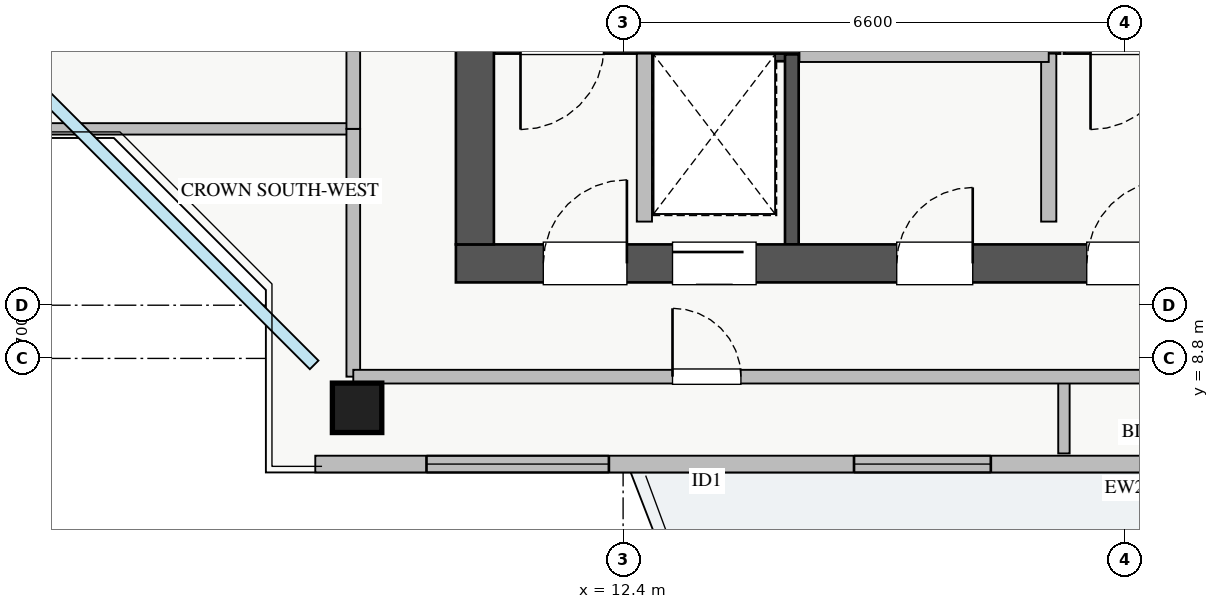
"""IFC4 building model, lengths in metres.
Left out: names, types, materials, properties, quantities, classifications, styles, units other than length and angle.
Written with IfcOpenShell. Run it as: python <this file> out.ifc"""

import sys

from ifc_helpers import new_model, si_unit, direction, frame, frame_2d, origin, origin_2d, place, context, subcontext, project, spatial, rectangle, extrude, source, transform, mapped, element, fill, save


model = new_model("IFC4")
c1 = context("Model", 3, precision=1e-05, world=origin(), true_north=direction((0.0, 1.0)))
c2 = subcontext(c1, "Body", "Model", "MODEL_VIEW")
j1 = project(units=[si_unit("LENGTHUNIT", "METRE"), si_unit("PLANEANGLEUNIT", "RADIAN")], contexts=[c1])
p1 = place(None, origin())
s1 = spatial("IfcSite", under=j1, at=p1, CompositionType="ELEMENT")
p2 = place(p1, origin())
s2 = spatial("IfcBuilding", under=s1, at=p2, CompositionType="ELEMENT")
p3 = place(p2, frame((0.0, 0.0, 250.25)))
s3 = spatial("IfcBuildingStorey", under=s2, at=p3, CompositionType="ELEMENT", Elevation=250.25)
p4 = place(p3, frame((12.68, 12.8, 0.0), z_axis=(0.0, 0.0, 1.0), x_axis=(1.0, 0.0, 0.0)))
e1 = element("IfcWall", 1, at=p4, inside=s3, PredefinedType="SHEAR", context=c2, shape_type="SweptSolid", body=[
    extrude(rectangle(XDim=1.94, YDim=0.18, at=frame_2d((0.97, 0.0))), origin(), (0.0, 0.0, 1.0), 3.07),
])
p5 = place(p3, frame((14.62, 10.3, 0.0), z_axis=(0.0, 0.0, 1.0), x_axis=(0.0, 1.0, 0.0)))
e2 = element("IfcWall", 2, at=p5, inside=s3, PredefinedType="SHEAR", context=c2, shape_type="SweptSolid", body=[
    extrude(rectangle(XDim=2.5, YDim=0.18, at=frame_2d((1.25, 0.0))), origin(), (0.0, 0.0, 1.0), 3.07),
])
p6 = place(p3, frame((10.7, 12.91, 0.0), z_axis=(0.0, 0.0, 1.0), x_axis=(1.0, 0.0, 0.0)))
e3 = element("IfcWall", 3, at=p6, inside=s3, PredefinedType="SHEAR", context=c2, shape_type="SweptSolid", body=[
    extrude(rectangle(XDim=7.45, YDim=0.2, at=frame_2d((3.725, 0.0))), origin(), (0.0, 0.0, 1.0), 3.25),
])
p7 = place(p6, frame((0.35, 0.0, 0.0)))
e4 = element("IfcOpeningElement", 4, at=p7, cuts=e3, PredefinedType="OPENING", context=c2, shape_type="SweptSolid", body=[
    extrude(rectangle(XDim=1.1, YDim=2.05, at=frame_2d((0.55, 1.025))), frame((0.0, 0.11, 0.0), z_axis=(0.0, -1.0, 0.0), x_axis=(1.0, 0.0, 0.0)), (0.0, 0.0, 1.0), 0.22),
])
p8 = place(p3, frame((18.2, 12.91, 0.0), z_axis=(0.0, 0.0, 1.0), x_axis=(1.0, 0.0, 0.0)))
e5 = element("IfcWall", 5, at=p8, inside=s3, PredefinedType="SHEAR", context=c2, shape_type="SweptSolid", body=[
    extrude(rectangle(XDim=7.15, YDim=0.2, at=frame_2d((3.575, 0.0))), origin(), (0.0, 0.0, 1.0), 3.25),
])
p9 = place(p8, frame((0.35, 0.0, 0.0)))
e6 = element("IfcOpeningElement", 6, at=p9, cuts=e5, PredefinedType="OPENING", context=c2, shape_type="SweptSolid", body=[
    extrude(rectangle(XDim=1.1, YDim=2.05, at=frame_2d((0.55, 1.025))), frame((0.0, 0.11, 0.0), z_axis=(0.0, -1.0, 0.0), x_axis=(1.0, 0.0, 0.0)), (0.0, 0.0, 1.0), 0.22),
])
p10 = place(p3, frame((10.2, 10.05, 0.0), z_axis=(0.0, 0.0, 1.0), x_axis=(1.0, 0.0, 0.0)))
e7 = element("IfcWall", 7, at=p10, inside=s3, PredefinedType="SHEAR", context=c2, shape_type="SweptSolid", body=[
    extrude(rectangle(XDim=17.6, YDim=0.5, at=frame_2d((8.8, 0.0))), origin(), (0.0, 0.0, 1.0), 3.25),
])
p11 = place(p10, frame((1.15, 0.0, 0.0)))
e8 = element("IfcOpeningElement", 8, at=p11, cuts=e7, PredefinedType="OPENING", context=c2, shape_type="SweptSolid", body=[
    extrude(rectangle(XDim=1.1, YDim=2.05, at=frame_2d((0.55, 1.025))), frame((0.0, 0.26, 0.0), z_axis=(0.0, -1.0, 0.0), x_axis=(1.0, 0.0, 0.0)), (0.0, 0.0, 1.0), 0.52),
])
p12 = place(p10, frame((8.3, 0.0, 0.0)))
e9 = element("IfcOpeningElement", 9, at=p12, cuts=e7, PredefinedType="OPENING", context=c2, shape_type="SweptSolid", body=[
    extrude(rectangle(XDim=1.1, YDim=2.05, at=frame_2d((0.55, 1.025))), frame((0.0, 0.26, 0.0), z_axis=(0.0, -1.0, 0.0), x_axis=(1.0, 0.0, 0.0)), (0.0, 0.0, 1.0), 0.52),
])
p13 = place(p10, frame((2.85, 0.0, 0.0)))
e10 = element("IfcOpeningElement", 10, at=p13, cuts=e7, PredefinedType="OPENING", context=c2, shape_type="SweptSolid", body=[
    extrude(rectangle(XDim=1.1, YDim=2.05, at=frame_2d((0.55, 1.025))), frame((0.0, 0.26, 0.0), z_axis=(0.0, -1.0, 0.0), x_axis=(1.0, 0.0, 0.0)), (0.0, 0.0, 1.0), 0.52),
])
p14 = place(p10, frame((5.8, 0.0, 0.0)))
e11 = element("IfcOpeningElement", 11, at=p14, cuts=e7, PredefinedType="OPENING", context=c2, shape_type="SweptSolid", body=[
    extrude(rectangle(XDim=1.0, YDim=2.05, at=frame_2d((0.5, 1.025))), frame((0.0, 0.26, 0.0), z_axis=(0.0, -1.0, 0.0), x_axis=(1.0, 0.0, 0.0)), (0.0, 0.0, 1.0), 0.52),
])
p15 = place(p10, frame((14.74, 0.0, 0.0)))
e12 = element("IfcOpeningElement", 12, at=p15, cuts=e7, PredefinedType="OPENING", context=c2, shape_type="SweptSolid", body=[
    extrude(rectangle(XDim=1.0, YDim=2.05, at=frame_2d((0.5, 1.025))), frame((0.0, 0.26, 0.0), z_axis=(0.0, -1.0, 0.0), x_axis=(1.0, 0.0, 0.0)), (0.0, 0.0, 1.0), 0.52),
])
p16 = place(p10, frame((10.64, 0.0, 0.0)))
e13 = element("IfcOpeningElement", 13, at=p16, cuts=e7, PredefinedType="OPENING", context=c2, shape_type="SweptSolid", body=[
    extrude(rectangle(XDim=1.0, YDim=2.05, at=frame_2d((0.5, 1.025))), frame((0.0, 0.26, 0.0), z_axis=(0.0, -1.0, 0.0), x_axis=(1.0, 0.0, 0.0)), (0.0, 0.0, 1.0), 0.52),
])
p17 = place(p10, frame((13.09, 0.0, 0.0)))
e14 = element("IfcOpeningElement", 14, at=p17, cuts=e7, PredefinedType="OPENING", context=c2, shape_type="SweptSolid", body=[
    extrude(rectangle(XDim=1.0, YDim=2.05, at=frame_2d((0.5, 1.025))), frame((0.0, 0.26, 0.0), z_axis=(0.0, -1.0, 0.0), x_axis=(1.0, 0.0, 0.0)), (0.0, 0.0, 1.0), 0.52),
])
p18 = place(p3, frame((10.45, 10.3, 0.0), z_axis=(0.0, 0.0, 1.0), x_axis=(0.0, 1.0, 0.0)))
e15 = element("IfcWall", 15, at=p18, inside=s3, PredefinedType="SHEAR", context=c2, shape_type="SweptSolid", body=[
    extrude(rectangle(XDim=6.2, YDim=0.5, at=frame_2d((3.1, 0.0))), origin(), (0.0, 0.0, 1.0), 3.25),
])
m1 = source(origin(), c2, "Body", "SweptSolid", [
    extrude(rectangle(XDim=0.65, YDim=0.65, at=origin_2d()), origin(), (0.0, 0.0, 1.0), 3.25),
])
p19 = place(p3, frame((8.9, 8.15, 0.0), z_axis=(0.0, 0.0, 1.0), x_axis=(1.0, 0.0, 0.0)))
e16 = element("IfcColumn", 16, at=p19, inside=s3, PredefinedType="COLUMN", context=c2, shape_type="MappedRepresentation", body=[
    mapped(m1, transform((0.0, 0.0, 0.0), x_axis=(1.0, 0.0, 0.0), y_axis=(0.0, 1.0, 0.0), z_axis=(0.0, 0.0, 1.0), scale=1.0)),
])
p20 = place(p3, frame((8.35, 7.41, 0.0), z_axis=(0.0, 0.0, 1.0), x_axis=(1.0, 0.0, 0.0)))
e17 = element("IfcWall", 17, at=p20, inside=s3, PredefinedType="STANDARD", context=c2, shape_type="SweptSolid", body=[
    extrude(rectangle(XDim=21.3, YDim=0.22, at=frame_2d((10.65, 0.0))), origin(), (0.0, 0.0, 1.0), 2.61),
])
p21 = place(p20, frame((11.5, 0.0, 0.0)))
e18 = element("IfcOpeningElement", 18, at=p21, cuts=e17, PredefinedType="OPENING", context=c2, shape_type="SweptSolid", body=[
    extrude(rectangle(XDim=1.2, YDim=2.1, at=frame_2d((0.6, 1.05))), frame((0.0, 0.12, 0.0), z_axis=(0.0, -1.0, 0.0), x_axis=(1.0, 0.0, 0.0)), (0.0, 0.0, 1.0), 0.24),
])
p22 = place(p20, frame((1.463, 0.0, 0.9)))
e19 = element("IfcOpeningElement", 19, at=p22, cuts=e17, PredefinedType="OPENING", context=c2, shape_type="SweptSolid", body=[
    extrude(rectangle(XDim=2.4, YDim=1.48, at=frame_2d((1.2, 0.74))), frame((0.0, 0.12, 0.0), z_axis=(0.0, -1.0, 0.0), x_axis=(1.0, 0.0, 0.0)), (0.0, 0.0, 1.0), 0.24),
])
p23 = place(p20, frame((7.088, 0.0, 0.9)))
e20 = element("IfcOpeningElement", 20, at=p23, cuts=e17, PredefinedType="OPENING", context=c2, shape_type="SweptSolid", body=[
    extrude(rectangle(XDim=1.8, YDim=1.45, at=frame_2d((0.9, 0.725))), frame((0.0, 0.12, 0.0), z_axis=(0.0, -1.0, 0.0), x_axis=(1.0, 0.0, 0.0)), (0.0, 0.0, 1.0), 0.24),
])
p24 = place(p20, frame((19.775, 0.0, 0.9)))
e21 = element("IfcOpeningElement", 21, at=p24, cuts=e17, PredefinedType="OPENING", context=c2, shape_type="SweptSolid", body=[
    extrude(rectangle(XDim=1.2, YDim=1.4, at=frame_2d((0.6, 0.7))), frame((0.0, 0.12, 0.0), z_axis=(0.0, -1.0, 0.0), x_axis=(1.0, 0.0, 0.0)), (0.0, 0.0, 1.0), 0.24),
])
p25 = place(p20, frame((14.86, 0.0, 0.9)))
e22 = element("IfcOpeningElement", 22, at=p25, cuts=e17, PredefinedType="OPENING", context=c2, shape_type="SweptSolid", body=[
    extrude(rectangle(XDim=2.4, YDim=1.5, at=frame_2d((1.2, 0.75))), frame((0.0, 0.12, 0.0), z_axis=(0.0, -1.0, 0.0), x_axis=(1.0, 0.0, 0.0)), (0.0, 0.0, 1.0), 0.24),
])
for number, where, z_axis, x_axis in (
    (23, (12.68, 10.6, 0.0), (0.0, 0.0, 1.0), (0.0, 1.0, 0.0)),
    (24, (18.0, 10.6, 0.0), (0.0, 0.0, 1.0), (0.0, 1.0, 0.0)),
):
    element("IfcWall", number, at=place(p3, frame(where, z_axis=z_axis, x_axis=x_axis)), inside=s3, PredefinedType="PARTITIONING", context=c2, shape_type="SweptSolid", body=[
        extrude(rectangle(XDim=2.21, YDim=0.2, at=frame_2d((1.105, 0.0))), origin(), (0.0, 0.0, 1.0), 3.07),
    ])
p26 = place(p3, frame((14.72, 12.8, 0.0), z_axis=(0.0, 0.0, 1.0), x_axis=(1.0, 0.0, 0.0)))
e25 = element("IfcWall", 25, at=p26, inside=s3, PredefinedType="PARTITIONING", context=c2, shape_type="SweptSolid", body=[
    extrude(rectangle(XDim=3.28, YDim=0.2, at=frame_2d((1.64, 0.0))), origin(), (0.0, 0.0, 1.0), 3.07),
])
p27 = place(p3, frame((3.55, 11.82, 0.0), z_axis=(0.0, 0.0, 1.0), x_axis=(1.0, 0.0, 0.0)))
e26 = element("IfcWall", 26, at=p27, inside=s3, PredefinedType="PARTITIONING", context=c2, shape_type="SweptSolid", body=[
    extrude(rectangle(XDim=5.3, YDim=0.15, at=frame_2d((2.65, 0.0))), origin(), (0.0, 0.0, 1.0), 3.07),
])
p28 = place(p3, frame((8.85, 8.56, 0.0), z_axis=(0.0, 0.0, 1.0), x_axis=(0.0, 1.0, 0.0)))
e27 = element("IfcWall", 27, at=p28, inside=s3, PredefinedType="PARTITIONING", context=c2, shape_type="SweptSolid", body=[
    extrude(rectangle(XDim=3.26, YDim=0.18, at=frame_2d((1.63, 0.0))), origin(), (0.0, 0.0, 1.0), 2.569),
])
p29 = place(p3, frame((18.2, 7.55, 0.0), z_axis=(0.0, 0.0, 1.0), x_axis=(0.0, 1.0, 0.0)))
e28 = element("IfcWall", 28, at=p29, inside=s3, PredefinedType="PARTITIONING", context=c2, shape_type="SweptSolid", body=[
    extrude(rectangle(XDim=1.01, YDim=0.15, at=frame_2d((0.505, 0.0))), origin(), (0.0, 0.0, 1.0), 3.07),
])
p30 = place(p3, frame((8.85, 8.56, 0.0), z_axis=(0.0, 0.0, 1.0), x_axis=(1.0, 0.0, 0.0)))
e29 = element("IfcWall", 29, at=p30, inside=s3, PredefinedType="PARTITIONING", context=c2, shape_type="SweptSolid", body=[
    extrude(rectangle(XDim=18.95, YDim=0.18, at=frame_2d((9.475, 0.0))), origin(), (0.0, 0.0, 1.0), 3.07),
])
p31 = place(p30, frame((4.2, 0.0, 0.0)))
e30 = element("IfcOpeningElement", 30, at=p31, cuts=e29, PredefinedType="OPENING", context=c2, shape_type="SweptSolid", body=[
    extrude(rectangle(XDim=0.9, YDim=2.05, at=frame_2d((0.45, 1.025))), frame((0.0, 0.1, 0.0), z_axis=(0.0, -1.0, 0.0), x_axis=(1.0, 0.0, 0.0)), (0.0, 0.0, 1.0), 0.2),
])
p32 = place(p30, frame((12.8, 0.0, 0.0)))
e31 = element("IfcOpeningElement", 31, at=p32, cuts=e29, PredefinedType="OPENING", context=c2, shape_type="SweptSolid", body=[
    extrude(rectangle(XDim=0.9, YDim=2.05, at=frame_2d((0.45, 1.025))), frame((0.0, 0.1, 0.0), z_axis=(0.0, -1.0, 0.0), x_axis=(1.0, 0.0, 0.0)), (0.0, 0.0, 1.0), 0.2),
])
p33 = place(p3, frame((8.85, 11.82, 0.0), z_axis=(0.0, 0.0, 1.0), x_axis=(0.0, 1.0, 0.0)))
e32 = element("IfcWall", 32, at=p33, inside=s3, PredefinedType="PARTITIONING", context=c2, shape_type="SweptSolid", body=[
    extrude(rectangle(XDim=22.36, YDim=0.18, at=frame_2d((11.18, 0.0))), origin(), (0.0, 0.0, 1.0), 2.569),
])
p34 = place(p33, frame((2.475, 0.0, 0.0)))
e33 = element("IfcOpeningElement", 33, at=p34, cuts=e32, PredefinedType="OPENING", context=c2, shape_type="SweptSolid", body=[
    extrude(rectangle(XDim=1.0, YDim=2.05, at=frame_2d((0.5, 1.025))), frame((0.0, 0.1, 0.0), z_axis=(0.0, -1.0, 0.0), x_axis=(1.0, 0.0, 0.0)), (0.0, 0.0, 1.0), 0.2),
])
p35 = place(p33, frame((13.91, 0.0, 0.0)))
e34 = element("IfcOpeningElement", 34, at=p35, cuts=e32, PredefinedType="OPENING", context=c2, shape_type="SweptSolid", body=[
    extrude(rectangle(XDim=1.0, YDim=2.05, at=frame_2d((0.5, 1.025))), frame((0.0, 0.1, 0.0), z_axis=(0.0, -1.0, 0.0), x_axis=(1.0, 0.0, 0.0)), (0.0, 0.0, 1.0), 0.2),
])
m2 = source(origin(), c2, "Body", "SweptSolid", [
    extrude(rectangle(XDim=2.4, YDim=1.48, at=frame_2d((1.2, 0.74))), frame((0.0, 0.03, 0.0), z_axis=(0.0, -1.0, 0.0), x_axis=(1.0, 0.0, 0.0)), (0.0, 0.0, 1.0), 0.06),
])
p36 = place(p22, origin())
e35 = element("IfcWindow", 35, at=p36, inside=s3, PartitioningType="TRIPLE_PANEL_VERTICAL", PredefinedType="WINDOW", context=c2, shape_type="MappedRepresentation", body=[
    mapped(m2, transform((0.0, 0.0, 0.0), x_axis=(1.0, 0.0, 0.0), y_axis=(0.0, 1.0, 0.0), z_axis=(0.0, 0.0, 1.0), scale=1.0)),
])
fill(e19, e35)
m3 = source(origin(), c2, "Body", "SweptSolid", [
    extrude(rectangle(XDim=1.8, YDim=1.45, at=frame_2d((0.9, 0.725))), frame((0.0, 0.03, 0.0), z_axis=(0.0, -1.0, 0.0), x_axis=(1.0, 0.0, 0.0)), (0.0, 0.0, 1.0), 0.06),
])
p37 = place(p23, origin())
e36 = element("IfcWindow", 36, at=p37, inside=s3, PartitioningType="DOUBLE_PANEL_VERTICAL", PredefinedType="WINDOW", context=c2, shape_type="MappedRepresentation", body=[
    mapped(m3, transform((0.0, 0.0, 0.0), x_axis=(1.0, 0.0, 0.0), y_axis=(0.0, 1.0, 0.0), z_axis=(0.0, 0.0, 1.0), scale=1.0)),
])
fill(e20, e36)
m4 = source(origin(), c2, "Body", "SweptSolid", [
    extrude(rectangle(XDim=1.1, YDim=2.05, at=frame_2d((0.55, 1.025))), frame((0.0, 0.025, 0.0), z_axis=(0.0, -1.0, 0.0), x_axis=(1.0, 0.0, 0.0)), (0.0, 0.0, 1.0), 0.05),
])
p38 = place(p11, origin())
e37 = element("IfcDoor", 37, at=p38, inside=s3, OperationType="SINGLE_SWING_RIGHT", PredefinedType="DOOR", context=c2, shape_type="MappedRepresentation", body=[
    mapped(m4, transform((0.0, 0.0, 0.0), x_axis=(1.0, 0.0, 0.0), y_axis=(0.0, 1.0, 0.0), z_axis=(0.0, 0.0, 1.0), scale=1.0)),
])
fill(e8, e37)
p39 = place(p12, origin())
e38 = element("IfcDoor", 38, at=p39, inside=s3, OperationType="SINGLE_SWING_RIGHT", PredefinedType="DOOR", context=c2, shape_type="MappedRepresentation", body=[
    mapped(m4, transform((0.0, 0.0, 0.0), x_axis=(1.0, 0.0, 0.0), y_axis=(0.0, 1.0, 0.0), z_axis=(0.0, 0.0, 1.0), scale=1.0)),
])
fill(e9, e38)
p40 = place(p13, origin())
e39 = element("IfcDoor", 39, at=p40, inside=s3, OperationType="SLIDING_TO_RIGHT", PredefinedType="DOOR", context=c2, shape_type="MappedRepresentation", body=[
    mapped(m4, transform((0.0, 0.0, 0.0), x_axis=(1.0, 0.0, 0.0), y_axis=(0.0, 1.0, 0.0), z_axis=(0.0, 0.0, 1.0), scale=1.0)),
])
fill(e10, e39)
m5 = source(origin(), c2, "Body", "SweptSolid", [
    extrude(rectangle(XDim=1.0, YDim=2.05, at=frame_2d((0.5, 1.025))), frame((0.0, 0.025, 0.0), z_axis=(0.0, -1.0, 0.0), x_axis=(1.0, 0.0, 0.0)), (0.0, 0.0, 1.0), 0.05),
])
p41 = place(p14, origin())
e40 = element("IfcDoor", 40, at=p41, inside=s3, OperationType="SINGLE_SWING_RIGHT", PredefinedType="DOOR", context=c2, shape_type="MappedRepresentation", body=[
    mapped(m5, transform((0.0, 0.0, 0.0), x_axis=(1.0, 0.0, 0.0), y_axis=(0.0, 1.0, 0.0), z_axis=(0.0, 0.0, 1.0), scale=1.0)),
])
fill(e11, e40)
m6 = source(origin(), c2, "Body", "SweptSolid", [
    extrude(rectangle(XDim=0.9, YDim=2.05, at=frame_2d((0.45, 1.025))), frame((0.0, 0.025, 0.0), z_axis=(0.0, -1.0, 0.0), x_axis=(1.0, 0.0, 0.0)), (0.0, 0.0, 1.0), 0.05),
])
p42 = place(p31, origin())
e41 = element("IfcDoor", 41, at=p42, inside=s3, OperationType="SINGLE_SWING_LEFT", PredefinedType="DOOR", context=c2, shape_type="MappedRepresentation", body=[
    mapped(m6, transform((0.0, 0.0, 0.0), x_axis=(1.0, 0.0, 0.0), y_axis=(0.0, 1.0, 0.0), z_axis=(0.0, 0.0, 1.0), scale=1.0)),
])
fill(e30, e41)
save(model, sys.argv[1])
